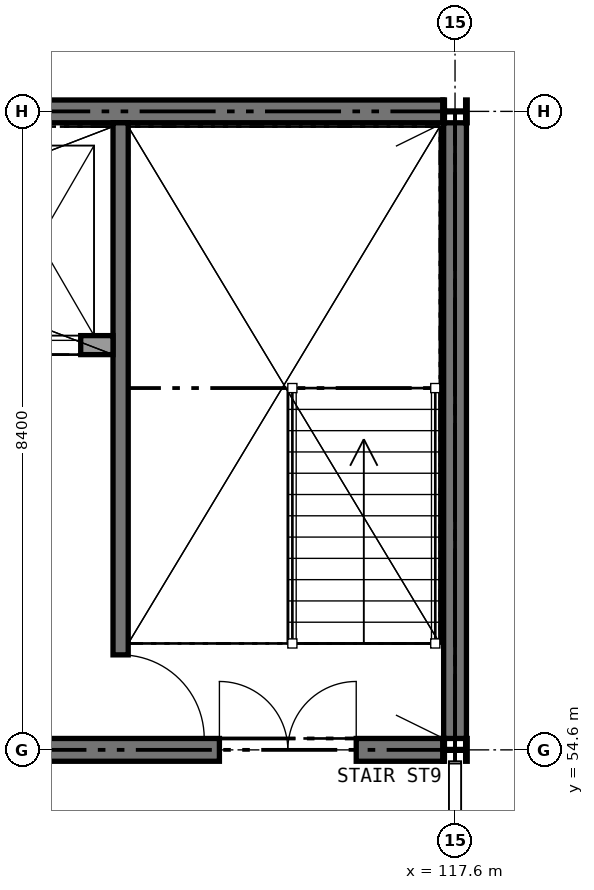
"""IFC4 building model, lengths in metres.
Left out: names, types, materials, properties, quantities, classifications, styles, units other than length and angle.
Written with IfcOpenShell. Run it as: python <this file> out.ifc"""

import sys

from ifc_helpers import new_model, si_unit, direction, frame, frame_2d, origin, origin_2d, place, context, subcontext, project, spatial, rectangle, hollow_rectangle, i_section, extrude, element, fill, save


model = new_model("IFC4")
c1 = context("Model", 3, precision=1e-05, world=origin(), true_north=direction((0.0, 1.0)))
c2 = subcontext(c1, "Body", "Model", "MODEL_VIEW")
j1 = project(units=[si_unit("LENGTHUNIT", "METRE"), si_unit("PLANEANGLEUNIT", "RADIAN")], contexts=[c1])
p1 = place(None, origin())
s1 = spatial("IfcSite", under=j1, at=p1, CompositionType="ELEMENT")
p2 = place(p1, origin())
s2 = spatial("IfcBuilding", under=s1, at=p2, CompositionType="ELEMENT")
p3 = place(p2, frame((0.0, 0.0, 67.6)))
s3 = spatial("IfcBuildingStorey", under=s2, at=p3, CompositionType="ELEMENT", Elevation=67.6)
p4 = place(p3, frame((100.95, 63.0, 0.0), z_axis=(0.0, 0.0, 1.0), x_axis=(1.0, 0.0, 0.0)))
e1 = element("IfcWall", 1, at=p4, inside=s3, PredefinedType="SHEAR", context=c2, shape_type="SweptSolid", body=[
    extrude(rectangle(XDim=16.49, YDim=0.3, at=frame_2d((8.245, 0.0))), origin(), (0.0, 0.0, 1.0), 4.2),
])
p5 = place(p3, frame((100.95, 54.6, 0.0), z_axis=(0.0, 0.0, 1.0), x_axis=(1.0, 0.0, 0.0)))
e2 = element("IfcWall", 2, at=p5, inside=s3, PredefinedType="SHEAR", context=c2, shape_type="SweptSolid", body=[
    extrude(rectangle(XDim=16.49, YDim=0.3, at=frame_2d((8.245, 0.0))), origin(), (0.0, 0.0, 1.0), 4.2),
])
p6 = place(p5, frame((1.15, 0.0, 0.0)))
e3 = element("IfcOpeningElement", 3, at=p6, cuts=e2, PredefinedType="OPENING", context=c2, shape_type="SweptSolid", body=[
    extrude(rectangle(XDim=1.8, YDim=2.1, at=frame_2d((0.9, 1.05))), frame((0.0, 0.16, 0.0), z_axis=(0.0, -1.0, 0.0), x_axis=(1.0, 0.0, 0.0)), (0.0, 0.0, 1.0), 0.32),
])
p7 = place(p5, frame((13.55, 0.0, 0.0)))
e4 = element("IfcOpeningElement", 4, at=p7, cuts=e2, PredefinedType="OPENING", context=c2, shape_type="SweptSolid", body=[
    extrude(rectangle(XDim=1.8, YDim=2.1, at=frame_2d((0.9, 1.05))), frame((0.0, 0.16, 0.0), z_axis=(0.0, -1.0, 0.0), x_axis=(1.0, 0.0, 0.0)), (0.0, 0.0, 1.0), 0.32),
])
p8 = place(p5, frame((7.05, 0.0, 0.0)))
e5 = element("IfcOpeningElement", 5, at=p8, cuts=e2, PredefinedType="OPENING", context=c2, shape_type="SweptSolid", body=[
    extrude(rectangle(XDim=2.4, YDim=2.4, at=frame_2d((1.2, 1.2))), frame((0.0, 0.16, 0.0), z_axis=(0.0, -1.0, 0.0), x_axis=(1.0, 0.0, 0.0)), (0.0, 0.0, 1.0), 0.32),
])
p9 = place(p3, frame((117.6, 54.75, 0.0), z_axis=(0.0, 0.0, 1.0), x_axis=(0.0, 1.0, 0.0)))
e6 = element("IfcWall", 6, at=p9, inside=s3, PredefinedType="SHEAR", context=c2, shape_type="SweptSolid", body=[
    extrude(rectangle(XDim=8.1, YDim=0.3, at=frame_2d((4.05, 0.0))), origin(), (0.0, 0.0, 1.0), 4.2),
])
for number, where, z_axis, x_axis in (
    (7, (117.6, 54.6, 0.0), (0.0, 0.0, 1.0), (0.0, 1.0, 0.0)),
    (8, (117.6, 63.0, 0.0), (0.0, 0.0, 1.0), (0.0, 1.0, 0.0)),
):
    element("IfcColumn", number, at=place(p3, frame(where, z_axis=z_axis, x_axis=x_axis)), inside=s3, PredefinedType="COLUMN", context=c2, shape_type="SweptSolid", body=[
        extrude(i_section(OverallWidth=0.3, OverallDepth=0.32, WebThickness=0.011, FlangeThickness=0.021, FilletRadius=0.027, at=origin_2d()), origin(), (0.0, 0.0, 1.0), 4.4),
    ])
for number, where, z_axis, x_axis in (
    (9, (117.6, 54.6, 4.4), (0.0, 0.0, 1.0), (1.0, 0.0, 0.0)),
    (10, (117.6, 63.0, 4.4), (0.0, 0.0, 1.0), (1.0, 0.0, 0.0)),
):
    element("IfcColumn", number, at=place(p3, frame(where, z_axis=z_axis, x_axis=x_axis)), inside=s3, PredefinedType="COLUMN", context=c2, shape_type="SweptSolid", body=[
        extrude(hollow_rectangle(XDim=0.15, YDim=0.25, WallThickness=0.01, at=origin_2d()), origin(), (0.0, 0.0, 1.0), 3.0),
    ])
p10 = place(p3, frame((117.6, 54.6, 4.4), z_axis=(0.0, 0.0, 1.0), x_axis=(0.0, 1.0, 0.0)))
e11 = element("IfcWall", 11, at=p10, inside=s3, PredefinedType="STANDARD", context=c2, shape_type="SweptSolid", body=[
    extrude(rectangle(XDim=8.4, YDim=0.3, at=frame_2d((4.2, 0.0))), origin(), (0.0, 0.0, 1.0), 3.0),
])
p11 = place(p3, frame((109.275, 54.6, 4.4), z_axis=(0.0, 0.0, 1.0), x_axis=(1.0, 0.0, 0.0)))
e12 = element("IfcWall", 12, at=p11, inside=s3, PredefinedType="STANDARD", context=c2, shape_type="SweptSolid", body=[
    extrude(rectangle(XDim=8.175, YDim=0.3, at=frame_2d((4.087, 0.0))), origin(), (0.0, 0.0, 1.0), 2.5),
])
p12 = place(p11, frame((5.575, 0.0, 0.0)))
e13 = element("IfcOpeningElement", 13, at=p12, cuts=e12, PredefinedType="OPENING", context=c2, shape_type="SweptSolid", body=[
    extrude(rectangle(XDim=1.1, YDim=2.1, at=frame_2d((0.55, 1.05))), frame((0.0, 0.16, 0.0), z_axis=(0.0, -1.0, 0.0), x_axis=(1.0, 0.0, 0.0)), (0.0, 0.0, 1.0), 0.32),
])
p13 = place(p11, frame((0.825, 0.0, 0.0)))
e14 = element("IfcOpeningElement", 14, at=p13, cuts=e12, PredefinedType="OPENING", context=c2, shape_type="SweptSolid", body=[
    extrude(rectangle(XDim=1.8, YDim=2.4, at=frame_2d((0.9, 1.2))), frame((0.0, 0.16, 0.0), z_axis=(0.0, -1.0, 0.0), x_axis=(1.0, 0.0, 0.0)), (0.0, 0.0, 1.0), 0.32),
])
p14 = place(p3, frame((109.275, 63.0, 4.4), z_axis=(0.0, 0.0, 1.0), x_axis=(1.0, 0.0, 0.0)))
e15 = element("IfcWall", 15, at=p14, inside=s3, PredefinedType="STANDARD", context=c2, shape_type="SweptSolid", body=[
    extrude(rectangle(XDim=8.175, YDim=0.3, at=frame_2d((4.087, 0.0))), origin(), (0.0, 0.0, 1.0), 2.5),
])
p15 = place(p3, frame((113.2, 62.85, 0.0), z_axis=(0.0, 0.0, 1.0), x_axis=(0.0, -1.0, 0.0)))
e16 = element("IfcWall", 16, at=p15, inside=s3, PredefinedType="SHEAR", context=c2, shape_type="SweptSolid", body=[
    extrude(rectangle(XDim=8.1, YDim=0.2, at=frame_2d((4.05, 0.0))), origin(), (0.0, 0.0, 1.0), 4.2),
])
p16 = place(p15, frame((7.0, 0.0, 0.0)))
e17 = element("IfcOpeningElement", 17, at=p16, cuts=e16, PredefinedType="OPENING", context=c2, shape_type="SweptSolid", body=[
    extrude(rectangle(XDim=1.11, YDim=2.1, at=frame_2d((0.555, 1.05))), frame((0.0, 0.11, 0.0), z_axis=(0.0, -1.0, 0.0), x_axis=(1.0, 0.0, 0.0)), (0.0, 0.0, 1.0), 0.22),
])
p17 = place(p3, frame((111.15, 59.925, 0.0), z_axis=(0.0, 0.0, 1.0), x_axis=(1.0, 0.0, 0.0)))
e18 = element("IfcWall", 18, at=p17, inside=s3, PredefinedType="SOLIDWALL", context=c2, shape_type="SweptSolid", body=[
    extrude(rectangle(XDim=1.95, YDim=0.25, at=frame_2d((0.975, 0.0))), origin(), (0.0, 0.0, 1.0), 7.4),
])
p18 = place(p17, frame((0.425, 0.0, 0.0)))
e19 = element("IfcOpeningElement", 19, at=p18, cuts=e18, PredefinedType="OPENING", context=c2, shape_type="SweptSolid", body=[
    extrude(rectangle(XDim=1.1, YDim=2.1, at=frame_2d((0.55, 1.05))), frame((0.0, 0.135, 0.0), z_axis=(0.0, -1.0, 0.0), x_axis=(1.0, 0.0, 0.0)), (0.0, 0.0, 1.0), 0.27),
])
p19 = place(p3, frame((113.2, 62.85, 4.4), z_axis=(0.0, 0.0, 1.0), x_axis=(0.0, -1.0, 0.0)))
e20 = element("IfcWall", 20, at=p19, inside=s3, PredefinedType="PARTITIONING", context=c2, shape_type="SweptSolid", body=[
    extrude(rectangle(XDim=8.1, YDim=0.2, at=frame_2d((4.05, 0.0))), origin(), (0.0, 0.0, 1.0), 2.6),
])
p20 = place(p12, origin())
e21 = element("IfcDoor", 21, at=p20, inside=s3, OperationType="SINGLE_SWING_RIGHT", PredefinedType="DOOR", context=c2, shape_type="SweptSolid", body=[
    extrude(rectangle(XDim=1.1, YDim=2.1, at=frame_2d((0.55, 1.05))), frame((0.0, 0.025, 0.0), z_axis=(0.0, -1.0, 0.0), x_axis=(1.0, 0.0, 0.0)), (0.0, 0.0, 1.0), 0.05),
])
fill(e13, e21)
p21 = place(p16, origin())
e22 = element("IfcDoor", 22, at=p21, inside=s3, OperationType="SINGLE_SWING_RIGHT", PredefinedType="DOOR", context=c2, shape_type="SweptSolid", body=[
    extrude(rectangle(XDim=1.1, YDim=2.1, at=frame_2d((0.55, 1.05))), frame((0.0, 0.025, 0.0), z_axis=(0.0, -1.0, 0.0), x_axis=(1.0, 0.0, 0.0)), (0.0, 0.0, 1.0), 0.05),
])
fill(e17, e22)
p22 = place(p18, frame((1.1, 0.0, 0.0), z_axis=(0.0, 0.0, 1.0), x_axis=(-1.0, 0.0, 0.0)))
e23 = element("IfcDoor", 23, at=p22, inside=s3, OperationType="SLIDING_TO_LEFT", PredefinedType="DOOR", context=c2, shape_type="SweptSolid", body=[
    extrude(rectangle(XDim=1.1, YDim=2.1, at=frame_2d((0.55, 1.05))), frame((0.0, 0.025, 0.0), z_axis=(0.0, -1.0, 0.0), x_axis=(1.0, 0.0, 0.0)), (0.0, 0.0, 1.0), 0.05),
])
fill(e19, e23)
p23 = place(p7, origin())
e24 = element("IfcDoor", 24, at=p23, inside=s3, OperationType="DOUBLE_DOOR_SINGLE_SWING", PredefinedType="DOOR", context=c2, shape_type="SweptSolid", body=[
    extrude(rectangle(XDim=1.8, YDim=2.1, at=frame_2d((0.9, 1.05))), frame((0.0, 0.025, 0.0), z_axis=(0.0, -1.0, 0.0), x_axis=(1.0, 0.0, 0.0)), (0.0, 0.0, 1.0), 0.05),
])
fill(e4, e24)
save(model, sys.argv[1])
